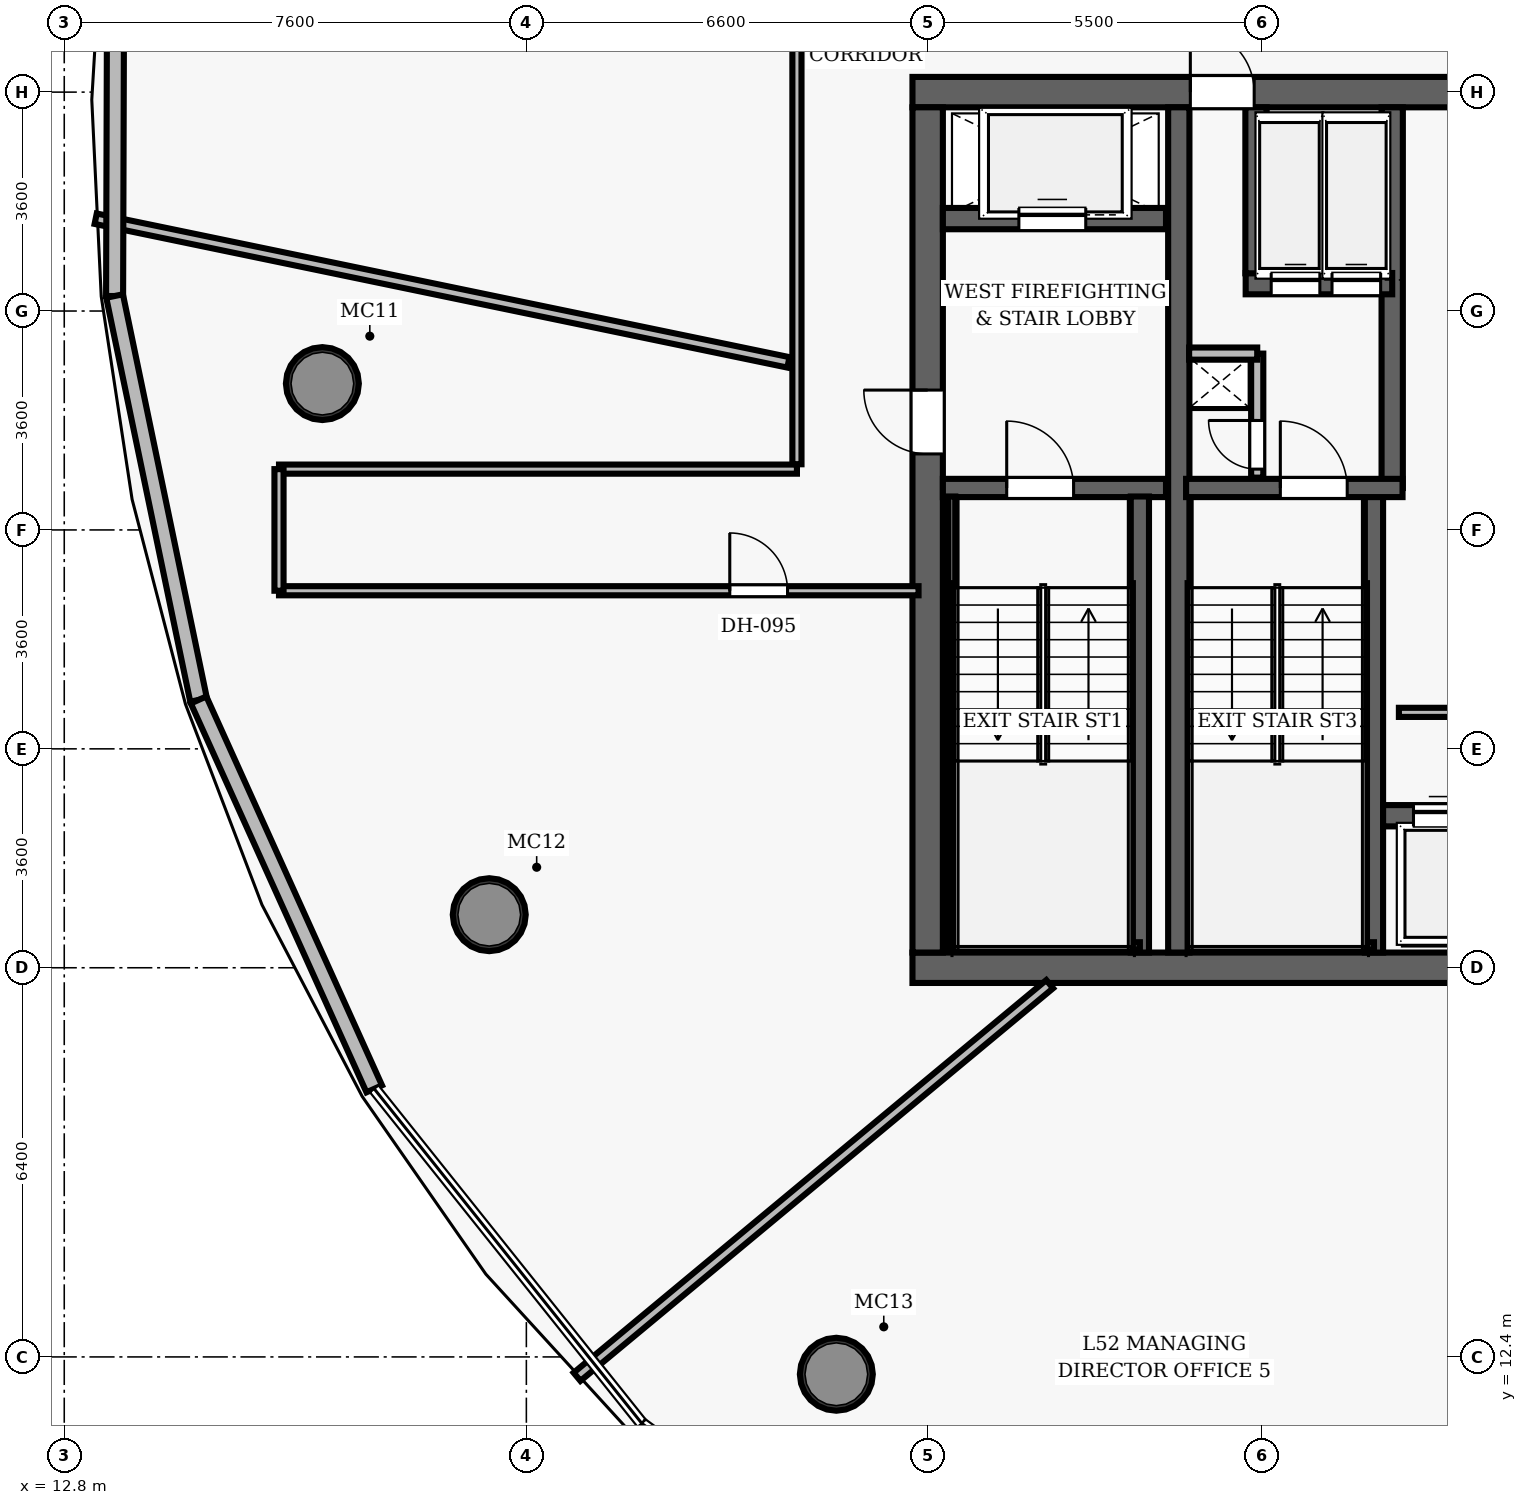
"""IFC4 building model, lengths in metres.
Left out: names, types, materials, properties, quantities, classifications, styles, units other than length and angle.
Written with IfcOpenShell. Run it as: python <this file> out.ifc"""

import sys

from ifc_helpers import new_model, si_unit, direction, frame, frame_2d, origin, origin_2d, place, context, subcontext, project, spatial, rectangle, hollow_circle, extrude, element, fill, save


model = new_model("IFC4")
c1 = context("Model", 3, precision=1e-05, world=origin(), true_north=direction((0.0, 1.0)))
c2 = subcontext(c1, "Body", "Model", "MODEL_VIEW")
j1 = project(units=[si_unit("LENGTHUNIT", "METRE"), si_unit("PLANEANGLEUNIT", "RADIAN")], contexts=[c1])
p1 = place(None, origin())
s1 = spatial("IfcSite", under=j1, at=p1, CompositionType="ELEMENT")
p2 = place(p1, origin())
s2 = spatial("IfcBuilding", under=s1, at=p2, CompositionType="ELEMENT")
p3 = place(p2, frame((0.0, 0.0, 205.85)))
s3 = spatial("IfcBuildingStorey", under=s2, at=p3, CompositionType="ELEMENT", Elevation=205.85)
p4 = place(p3, frame((26.75, 18.8, 0.0), z_axis=(0.0, 0.0, 1.0), x_axis=(1.0, 0.0, 0.0)))
e1 = element("IfcWall", 1, at=p4, inside=s3, PredefinedType="SHEAR", context=c2, shape_type="SweptSolid", body=[
    extrude(rectangle(XDim=22.5, YDim=0.5, at=frame_2d((11.25, 0.0))), origin(), (0.0, 0.0, 1.0), 3.85),
])
p5 = place(p4, frame((14.47, 0.0, 0.0)))
e2 = element("IfcOpeningElement", 2, at=p5, cuts=e1, PredefinedType="OPENING", context=c2, shape_type="SweptSolid", body=[
    extrude(rectangle(XDim=1.05, YDim=2.15, at=frame_2d((0.525, 1.075))), frame((0.0, 0.26, 0.0), z_axis=(0.0, -1.0, 0.0), x_axis=(1.0, 0.0, 0.0)), (0.0, 0.0, 1.0), 0.52),
])
p6 = place(p3, frame((26.75, 33.2, 0.0), z_axis=(0.0, 0.0, 1.0), x_axis=(1.0, 0.0, 0.0)))
e3 = element("IfcWall", 3, at=p6, inside=s3, PredefinedType="SHEAR", context=c2, shape_type="SweptSolid", body=[
    extrude(rectangle(XDim=22.5, YDim=0.5, at=frame_2d((11.25, 0.0))), origin(), (0.0, 0.0, 1.0), 3.85),
])
p7 = place(p6, frame((4.57, 0.0, 0.0)))
e4 = element("IfcOpeningElement", 4, at=p7, cuts=e3, PredefinedType="OPENING", context=c2, shape_type="SweptSolid", body=[
    extrude(rectangle(XDim=1.05, YDim=2.15, at=frame_2d((0.525, 1.075))), frame((0.0, 0.26, 0.0), z_axis=(0.0, -1.0, 0.0), x_axis=(1.0, 0.0, 0.0)), (0.0, 0.0, 1.0), 0.52),
])
p8 = place(p6, frame((14.47, 0.0, 0.0)))
e5 = element("IfcOpeningElement", 5, at=p8, cuts=e3, PredefinedType="OPENING", context=c2, shape_type="SweptSolid", body=[
    extrude(rectangle(XDim=1.05, YDim=2.15, at=frame_2d((0.525, 1.075))), frame((0.0, 0.26, 0.0), z_axis=(0.0, -1.0, 0.0), x_axis=(1.0, 0.0, 0.0)), (0.0, 0.0, 1.0), 0.52),
])
p9 = place(p3, frame((27.0, 19.05, 0.0), z_axis=(0.0, 0.0, 1.0), x_axis=(0.0, 1.0, 0.0)))
e6 = element("IfcWall", 6, at=p9, inside=s3, PredefinedType="SHEAR", context=c2, shape_type="SweptSolid", body=[
    extrude(rectangle(XDim=13.9, YDim=0.5, at=frame_2d((6.95, 0.0))), origin(), (0.0, 0.0, 1.0), 3.85),
])
p10 = place(p9, frame((8.2, 0.0, 0.0)))
e7 = element("IfcOpeningElement", 7, at=p10, cuts=e6, PredefinedType="OPENING", context=c2, shape_type="SweptSolid", body=[
    extrude(rectangle(XDim=1.05, YDim=2.15, at=frame_2d((0.525, 1.075))), frame((0.0, 0.26, 0.0), z_axis=(0.0, -1.0, 0.0), x_axis=(1.0, 0.0, 0.0)), (0.0, 0.0, 1.0), 0.52),
])
p11 = place(p3, frame((31.13, 19.05, 0.0), z_axis=(0.0, 0.0, 1.0), x_axis=(0.0, 1.0, 0.0)))
e8 = element("IfcWall", 8, at=p11, inside=s3, PredefinedType="SHEAR", context=c2, shape_type="SweptSolid", body=[
    extrude(rectangle(XDim=13.9, YDim=0.35, at=frame_2d((6.95, 0.0))), origin(), (0.0, 0.0, 1.0), 3.85),
])
for number, where, z_axis, x_axis in (
    (9, (17.045, 28.406, 0.0), (0.0, 0.0, 1.0), (1.0, 0.0, 0.0)),
    (10, (19.79, 19.673, 0.0), (0.0, 0.0, 1.0), (1.0, 0.0, 0.0)),
    (11, (25.498, 12.115, 0.0), (0.0, 0.0, 1.0), (1.0, 0.0, 0.0)),
):
    element("IfcColumn", number, at=place(p3, frame(where, z_axis=z_axis, x_axis=x_axis)), inside=s3, PredefinedType="COLUMN", context=c2, shape_type="SweptSolid", body=[
        extrude(hollow_circle(Radius=0.6, WallThickness=0.05, at=origin_2d()), origin(), (0.0, 0.0, 1.0), 3.85),
    ])
p12 = place(p3, frame((27.25, 26.69, 0.0), z_axis=(0.0, 0.0, 1.0), x_axis=(1.0, 0.0, 0.0)))
e12 = element("IfcWall", 12, at=p12, inside=s3, PredefinedType="SHEAR", context=c2, shape_type="SweptSolid", body=[
    extrude(rectangle(XDim=3.67, YDim=0.3, at=frame_2d((1.835, 0.0))), origin(), (0.0, 0.0, 1.0), 3.85),
])
p13 = place(p12, frame((1.05, 0.0, 0.0)))
e13 = element("IfcOpeningElement", 13, at=p13, cuts=e12, PredefinedType="OPENING", context=c2, shape_type="SweptSolid", body=[
    extrude(rectangle(XDim=1.1, YDim=2.15, at=frame_2d((0.55, 1.075))), frame((0.0, 0.16, 0.0), z_axis=(0.0, -1.0, 0.0), x_axis=(1.0, 0.0, 0.0)), (0.0, 0.0, 1.0), 0.32),
])
p14 = place(p3, frame((30.49, 19.05, 0.0), z_axis=(0.0, 0.0, 1.0), x_axis=(0.0, 1.0, 0.0)))
e14 = element("IfcWall", 14, at=p14, inside=s3, PredefinedType="SHEAR", context=c2, shape_type="SweptSolid", body=[
    extrude(rectangle(XDim=7.5, YDim=0.3, at=frame_2d((3.75, 0.0))), origin(), (0.0, 0.0, 1.0), 3.85),
])
p15 = place(p3, frame((27.395, 19.1, 0.0), z_axis=(0.0, 0.0, 1.0), x_axis=(0.0, 1.0, 0.0)))
e15 = element("IfcWall", 15, at=p15, inside=s3, PredefinedType="SHEAR", context=c2, shape_type="SweptSolid", body=[
    extrude(rectangle(XDim=7.45, YDim=0.12, at=frame_2d((3.725, 0.0))), origin(), (0.0, 0.0, 1.0), 3.85),
])
p16 = place(p3, frame((27.395, 19.16, 0.0), z_axis=(0.0, 0.0, 1.0), x_axis=(1.0, 0.0, 0.0)))
e16 = element("IfcWall", 16, at=p16, inside=s3, PredefinedType="SHEAR", context=c2, shape_type="SweptSolid", body=[
    extrude(rectangle(XDim=3.095, YDim=0.12, at=frame_2d((1.547, 0.0))), origin(), (0.0, 0.0, 1.0), 3.85),
])
p17 = place(p3, frame((27.25, 31.12, 0.0), z_axis=(0.0, 0.0, 1.0), x_axis=(1.0, 0.0, 0.0)))
e17 = element("IfcWall", 17, at=p17, inside=s3, PredefinedType="SHEAR", context=c2, shape_type="SweptSolid", body=[
    extrude(rectangle(XDim=3.67, YDim=0.35, at=frame_2d((1.835, 0.0))), origin(), (0.0, 0.0, 1.0), 3.035),
])
p18 = place(p17, frame((1.25, 0.0, 0.0)))
e18 = element("IfcOpeningElement", 18, at=p18, cuts=e17, PredefinedType="OPENING", context=c2, shape_type="SweptSolid", body=[
    extrude(rectangle(XDim=1.1, YDim=2.15, at=frame_2d((0.55, 1.075))), frame((0.0, 0.185, 0.0), z_axis=(0.0, -1.0, 0.0), x_axis=(1.0, 0.0, 0.0)), (0.0, 0.0, 1.0), 0.37),
])
p19 = place(p3, frame((34.34, 19.05, 0.0), z_axis=(0.0, 0.0, 1.0), x_axis=(0.0, 1.0, 0.0)))
e19 = element("IfcWall", 19, at=p19, inside=s3, PredefinedType="SHEAR", context=c2, shape_type="SweptSolid", body=[
    extrude(rectangle(XDim=7.5, YDim=0.3, at=frame_2d((3.75, 0.0))), origin(), (0.0, 0.0, 1.0), 3.85),
])
p20 = place(p3, frame((34.64, 26.69, 0.0), z_axis=(0.0, 0.0, 1.0), x_axis=(0.0, 1.0, 0.0)))
e20 = element("IfcWall", 20, at=p20, inside=s3, PredefinedType="SHEAR", context=c2, shape_type="SweptSolid", body=[
    extrude(rectangle(XDim=6.26, YDim=0.35, at=frame_2d((3.13, 0.0))), origin(), (0.0, 0.0, 1.0), 3.85),
])
p21 = place(p3, frame((31.25, 26.69, 0.0), z_axis=(0.0, 0.0, 1.0), x_axis=(1.0, 0.0, 0.0)))
e21 = element("IfcWall", 21, at=p21, inside=s3, PredefinedType="SHEAR", context=c2, shape_type="SweptSolid", body=[
    extrude(rectangle(XDim=3.56, YDim=0.3, at=frame_2d((1.78, 0.0))), origin(), (0.0, 0.0, 1.0), 3.85),
])
p22 = place(p21, frame((1.55, 0.0, 0.0)))
e22 = element("IfcOpeningElement", 22, at=p22, cuts=e21, PredefinedType="OPENING", context=c2, shape_type="SweptSolid", body=[
    extrude(rectangle(XDim=1.1, YDim=2.15, at=frame_2d((0.55, 1.075))), frame((0.0, 0.16, 0.0), z_axis=(0.0, -1.0, 0.0), x_axis=(1.0, 0.0, 0.0)), (0.0, 0.0, 1.0), 0.32),
])
p23 = place(p3, frame((31.3, 19.16, 0.0), z_axis=(0.0, 0.0, 1.0), x_axis=(1.0, 0.0, 0.0)))
e23 = element("IfcWall", 23, at=p23, inside=s3, PredefinedType="SHEAR", context=c2, shape_type="SweptSolid", body=[
    extrude(rectangle(XDim=3.04, YDim=0.12, at=frame_2d((1.52, 0.0))), origin(), (0.0, 0.0, 1.0), 3.85),
])
p24 = place(p3, frame((32.23, 30.05, 0.0), z_axis=(0.0, 0.0, 1.0), x_axis=(1.0, 0.0, 0.0)))
e24 = element("IfcWall", 24, at=p24, inside=s3, PredefinedType="SHEAR", context=c2, shape_type="SweptSolid", body=[
    extrude(rectangle(XDim=2.41, YDim=0.35, at=frame_2d((1.205, 0.0))), origin(), (0.0, 0.0, 1.0), 3.035),
])
p25 = place(p24, frame((0.42, 0.0, 0.0)))
e25 = element("IfcOpeningElement", 25, at=p25, cuts=e24, PredefinedType="OPENING", context=c2, shape_type="SweptSolid", body=[
    extrude(rectangle(XDim=0.8, YDim=2.15, at=frame_2d((0.4, 1.075))), frame((0.0, 0.185, 0.0), z_axis=(0.0, -1.0, 0.0), x_axis=(1.0, 0.0, 0.0)), (0.0, 0.0, 1.0), 0.37),
])
p26 = place(p24, frame((1.42, 0.0, 0.0)))
e26 = element("IfcOpeningElement", 26, at=p26, cuts=e24, PredefinedType="OPENING", context=c2, shape_type="SweptSolid", body=[
    extrude(rectangle(XDim=0.8, YDim=2.15, at=frame_2d((0.4, 1.075))), frame((0.0, 0.185, 0.0), z_axis=(0.0, -1.0, 0.0), x_axis=(1.0, 0.0, 0.0)), (0.0, 0.0, 1.0), 0.37),
])
p27 = place(p3, frame((32.4, 30.22, 0.0), z_axis=(0.0, 0.0, 1.0), x_axis=(0.0, 1.0, 0.0)))
e27 = element("IfcWall", 27, at=p27, inside=s3, PredefinedType="SHEAR", context=c2, shape_type="SweptSolid", body=[
    extrude(rectangle(XDim=2.73, YDim=0.35, at=frame_2d((1.365, 0.0))), origin(), (0.0, 0.0, 1.0), 3.035),
])
p28 = place(p3, frame((32.42, 26.86, 0.0), z_axis=(0.0, 0.0, 1.0), x_axis=(0.0, 1.0, 0.0)))
e28 = element("IfcWall", 28, at=p28, inside=s3, PredefinedType="PARTITIONING", context=c2, shape_type="SweptSolid", body=[
    extrude(rectangle(XDim=2.04, YDim=0.2, at=frame_2d((1.02, 0.0))), origin(), (0.0, 0.0, 1.0), 3.035),
])
p29 = place(p28, frame((0.14, 0.0, 0.0)))
e29 = element("IfcOpeningElement", 29, at=p29, cuts=e28, PredefinedType="OPENING", context=c2, shape_type="SweptSolid", body=[
    extrude(rectangle(XDim=0.8, YDim=2.05, at=frame_2d((0.4, 1.025))), frame((0.0, 0.11, 0.0), z_axis=(0.0, -1.0, 0.0), x_axis=(1.0, 0.0, 0.0)), (0.0, 0.0, 1.0), 0.22),
])
p30 = place(p3, frame((31.3, 28.9, 0.0), z_axis=(0.0, 0.0, 1.0), x_axis=(1.0, 0.0, 0.0)))
e30 = element("IfcWall", 30, at=p30, inside=s3, PredefinedType="PARTITIONING", context=c2, shape_type="SweptSolid", body=[
    extrude(rectangle(XDim=1.12, YDim=0.2, at=frame_2d((0.56, 0.0))), origin(), (0.0, 0.0, 1.0), 3.035),
])
p31 = place(p3, frame((34.49, 21.3, 0.0), z_axis=(0.0, 0.0, 1.0), x_axis=(1.0, 0.0, 0.0)))
e31 = element("IfcWall", 31, at=p31, inside=s3, PredefinedType="SHEAR", context=c2, shape_type="SweptSolid", body=[
    extrude(rectangle(XDim=6.68, YDim=0.35, at=frame_2d((3.34, 0.0))), origin(), (0.0, 0.0, 1.0), 3.035),
])
p32 = place(p31, frame((0.5, 0.0, 0.0)))
e32 = element("IfcOpeningElement", 32, at=p32, cuts=e31, PredefinedType="OPENING", context=c2, shape_type="SweptSolid", body=[
    extrude(rectangle(XDim=0.9, YDim=2.15, at=frame_2d((0.45, 1.075))), frame((0.0, 0.185, 0.0), z_axis=(0.0, -1.0, 0.0), x_axis=(1.0, 0.0, 0.0)), (0.0, 0.0, 1.0), 0.37),
])
p33 = place(p31, frame((2.58, 0.0, 0.0)))
e33 = element("IfcOpeningElement", 33, at=p33, cuts=e31, PredefinedType="OPENING", context=c2, shape_type="SweptSolid", body=[
    extrude(rectangle(XDim=0.9, YDim=2.15, at=frame_2d((0.45, 1.075))), frame((0.0, 0.185, 0.0), z_axis=(0.0, -1.0, 0.0), x_axis=(1.0, 0.0, 0.0)), (0.0, 0.0, 1.0), 0.37),
])
p34 = place(p31, frame((4.66, 0.0, 0.0)))
e34 = element("IfcOpeningElement", 34, at=p34, cuts=e31, PredefinedType="OPENING", context=c2, shape_type="SweptSolid", body=[
    extrude(rectangle(XDim=0.9, YDim=2.15, at=frame_2d((0.45, 1.075))), frame((0.0, 0.185, 0.0), z_axis=(0.0, -1.0, 0.0), x_axis=(1.0, 0.0, 0.0)), (0.0, 0.0, 1.0), 0.37),
])
p35 = place(p3, frame((34.75, 23.0, 0.0), z_axis=(0.0, 0.0, 1.0), x_axis=(1.0, 0.0, 0.0)))
e35 = element("IfcWall", 35, at=p35, inside=s3, PredefinedType="PARTITIONING", context=c2, shape_type="SweptSolid", body=[
    extrude(rectangle(XDim=6.25, YDim=0.15, at=frame_2d((3.125, 0.0))), origin(), (0.0, 0.0, 1.0), 3.035),
])
p36 = place(p3, frame((24.85, 27.08, 0.0), z_axis=(0.0, 0.0, 1.0), x_axis=(0.0, 1.0, 0.0)))
e36 = element("IfcWall", 36, at=p36, inside=s3, PredefinedType="PARTITIONING", context=c2, shape_type="SweptSolid", body=[
    extrude(rectangle(XDim=8.12, YDim=0.15, at=frame_2d((4.06, 0.0))), origin(), (0.0, 0.0, 1.0), 3.035),
])
p37 = place(p3, frame((16.332, 27.0, 0.0), z_axis=(0.0, 0.0, 1.0), x_axis=(1.0, 0.0, 0.0)))
e37 = element("IfcWall", 37, at=p37, inside=s3, PredefinedType="PARTITIONING", context=c2, shape_type="SweptSolid", body=[
    extrude(rectangle(XDim=8.518, YDim=0.15, at=frame_2d((4.259, 0.0))), origin(), (0.0, 0.0, 1.0), 3.035),
])
p38 = place(p3, frame((16.332, 25.0, 0.0), z_axis=(0.0, 0.0, 1.0), x_axis=(1.0, 0.0, 0.0)))
e38 = element("IfcWall", 38, at=p38, inside=s3, PredefinedType="PARTITIONING", context=c2, shape_type="SweptSolid", body=[
    extrude(rectangle(XDim=10.518, YDim=0.15, at=frame_2d((5.259, 0.0))), origin(), (0.0, 0.0, 1.0), 3.035),
])
p39 = place(p38, frame((7.414, 0.0, 0.0)))
e39 = element("IfcOpeningElement", 39, at=p39, cuts=e38, PredefinedType="OPENING", context=c2, shape_type="SweptSolid", body=[
    extrude(rectangle(XDim=0.95, YDim=2.15, at=frame_2d((0.475, 1.075))), frame((0.0, 0.085, 0.0), z_axis=(0.0, -1.0, 0.0), x_axis=(1.0, 0.0, 0.0)), (0.0, 0.0, 1.0), 0.17),
])
p40 = place(p3, frame((16.332, 25.0, 0.0), z_axis=(0.0, 0.0, 1.0), x_axis=(0.0, 1.0, 0.0)))
e40 = element("IfcWall", 40, at=p40, inside=s3, PredefinedType="PARTITIONING", context=c2, shape_type="SweptSolid", body=[
    extrude(rectangle(XDim=2.0, YDim=0.15, at=frame_2d((1.0, 0.0))), origin(), (0.0, 0.0, 1.0), 3.035),
])
p41 = place(p3, frame((24.71, 28.756, 0.0), z_axis=(0.0, 0.0, 1.0), x_axis=(-0.979173048769, 0.203027437961, 0.0)))
e41 = element("IfcWall", 41, at=p41, inside=s3, PredefinedType="PARTITIONING", context=c2, shape_type="SweptSolid", body=[
    extrude(rectangle(XDim=11.635, YDim=0.175, at=frame_2d((5.818, 0.0))), origin(), (0.0, 0.0, 1.0), 3.035),
])
p42 = place(p3, frame((29.007, 18.53, 0.0), z_axis=(0.0, 0.0, 1.0), x_axis=(-0.769234217395, -0.638966915253, 0.0)))
e42 = element("IfcWall", 42, at=p42, inside=s3, PredefinedType="PARTITIONING", context=c2, shape_type="SweptSolid", body=[
    extrude(rectangle(XDim=10.105, YDim=0.175, at=frame_2d((5.053, 0.0))), origin(), (0.0, 0.0, 1.0), 3.035),
])
p43 = place(p3, frame((13.628, 29.847, 0.0), z_axis=(0.0, 0.0, 1.0), x_axis=(0.003136870423, 0.99999508001, 0.0)))
e43 = element("IfcWall", 43, at=p43, inside=s3, PredefinedType="SOLIDWALL", context=c2, shape_type="SweptSolid", body=[
    extrude(rectangle(XDim=6.226, YDim=0.28, at=frame_2d((3.113, 0.0))), origin(), (0.0, 0.0, 1.0), 3.62),
])
p44 = place(p3, frame((15.009, 23.204, 0.0), z_axis=(0.0, 0.0, 1.0), x_axis=(-0.203597872563, 0.979054598216, 0.0)))
e44 = element("IfcWall", 44, at=p44, inside=s3, PredefinedType="SOLIDWALL", context=c2, shape_type="SweptSolid", body=[
    extrude(rectangle(XDim=6.785, YDim=0.28, at=frame_2d((3.392, 0.0))), origin(), (0.0, 0.0, 1.0), 3.62),
])
p45 = place(p3, frame((17.898, 16.809, 0.0), z_axis=(0.0, 0.0, 1.0), x_axis=(-0.411673410611, 0.911331445192, 0.0)))
e45 = element("IfcWall", 45, at=p45, inside=s3, PredefinedType="SOLIDWALL", context=c2, shape_type="SweptSolid", body=[
    extrude(rectangle(XDim=7.018, YDim=0.28, at=frame_2d((3.509, 0.0))), origin(), (0.0, 0.0, 1.0), 3.62),
])
p46 = place(p13, origin())
e46 = element("IfcDoor", 46, at=p46, inside=s3, OperationType="SINGLE_SWING_LEFT", PredefinedType="DOOR", context=c2, shape_type="SweptSolid", body=[
    extrude(rectangle(XDim=1.1, YDim=2.15, at=frame_2d((0.55, 1.075))), frame((0.0, 0.025, 0.0), z_axis=(0.0, -1.0, 0.0), x_axis=(1.0, 0.0, 0.0)), (0.0, 0.0, 1.0), 0.05),
])
fill(e13, e46)
p47 = place(p10, origin())
e47 = element("IfcDoor", 47, at=p47, inside=s3, OperationType="SINGLE_SWING_RIGHT", PredefinedType="DOOR", context=c2, shape_type="SweptSolid", body=[
    extrude(rectangle(XDim=1.05, YDim=2.15, at=frame_2d((0.525, 1.075))), frame((0.0, 0.025, 0.0), z_axis=(0.0, -1.0, 0.0), x_axis=(1.0, 0.0, 0.0)), (0.0, 0.0, 1.0), 0.05),
])
fill(e7, e47)
p48 = place(p22, origin())
e48 = element("IfcDoor", 48, at=p48, inside=s3, OperationType="SINGLE_SWING_LEFT", PredefinedType="DOOR", context=c2, shape_type="SweptSolid", body=[
    extrude(rectangle(XDim=1.1, YDim=2.15, at=frame_2d((0.55, 1.075))), frame((0.0, 0.025, 0.0), z_axis=(0.0, -1.0, 0.0), x_axis=(1.0, 0.0, 0.0)), (0.0, 0.0, 1.0), 0.05),
])
fill(e22, e48)
p49 = place(p29, origin())
e49 = element("IfcDoor", 49, at=p49, inside=s3, OperationType="SINGLE_SWING_RIGHT", PredefinedType="DOOR", context=c2, shape_type="SweptSolid", body=[
    extrude(rectangle(XDim=0.8, YDim=2.05, at=frame_2d((0.4, 1.025))), frame((0.0, 0.025, 0.0), z_axis=(0.0, -1.0, 0.0), x_axis=(1.0, 0.0, 0.0)), (0.0, 0.0, 1.0), 0.05),
])
fill(e29, e49)
p50 = place(p7, origin())
e50 = element("IfcDoor", 50, at=p50, inside=s3, OperationType="SINGLE_SWING_LEFT", PredefinedType="DOOR", context=c2, shape_type="SweptSolid", body=[
    extrude(rectangle(XDim=1.05, YDim=2.15, at=frame_2d((0.525, 1.075))), frame((0.0, 0.025, 0.0), z_axis=(0.0, -1.0, 0.0), x_axis=(1.0, 0.0, 0.0)), (0.0, 0.0, 1.0), 0.05),
])
fill(e4, e50)
p51 = place(p39, origin())
e51 = element("IfcDoor", 51, at=p51, inside=s3, OperationType="SINGLE_SWING_LEFT", PredefinedType="DOOR", context=c2, shape_type="SweptSolid", body=[
    extrude(rectangle(XDim=0.95, YDim=2.15, at=frame_2d((0.475, 1.075))), frame((0.0, 0.025, 0.0), z_axis=(0.0, -1.0, 0.0), x_axis=(1.0, 0.0, 0.0)), (0.0, 0.0, 1.0), 0.05),
])
fill(e39, e51)
p52 = place(p32, origin())
e52 = element("IfcDoor", 52, at=p52, inside=s3, OperationType="SLIDING_TO_LEFT", PredefinedType="DOOR", context=c2, shape_type="SweptSolid", body=[
    extrude(rectangle(XDim=0.9, YDim=2.15, at=frame_2d((0.45, 1.075))), frame((0.0, 0.025, 0.0), z_axis=(0.0, -1.0, 0.0), x_axis=(1.0, 0.0, 0.0)), (0.0, 0.0, 1.0), 0.05),
])
fill(e32, e52)
p53 = place(p18, origin())
e53 = element("IfcDoor", 53, at=p53, inside=s3, OperationType="SLIDING_TO_LEFT", PredefinedType="DOOR", context=c2, shape_type="SweptSolid", body=[
    extrude(rectangle(XDim=1.1, YDim=2.15, at=frame_2d((0.55, 1.075))), frame((0.0, 0.025, 0.0), z_axis=(0.0, -1.0, 0.0), x_axis=(1.0, 0.0, 0.0)), (0.0, 0.0, 1.0), 0.05),
])
fill(e18, e53)
p54 = place(p25, origin())
e54 = element("IfcDoor", 54, at=p54, inside=s3, OperationType="SLIDING_TO_LEFT", PredefinedType="DOOR", context=c2, shape_type="SweptSolid", body=[
    extrude(rectangle(XDim=0.8, YDim=2.15, at=frame_2d((0.4, 1.075))), frame((0.0, 0.025, 0.0), z_axis=(0.0, -1.0, 0.0), x_axis=(1.0, 0.0, 0.0)), (0.0, 0.0, 1.0), 0.05),
])
fill(e25, e54)
p55 = place(p26, origin())
e55 = element("IfcDoor", 55, at=p55, inside=s3, OperationType="SLIDING_TO_LEFT", PredefinedType="DOOR", context=c2, shape_type="SweptSolid", body=[
    extrude(rectangle(XDim=0.8, YDim=2.15, at=frame_2d((0.4, 1.075))), frame((0.0, 0.025, 0.0), z_axis=(0.0, -1.0, 0.0), x_axis=(1.0, 0.0, 0.0)), (0.0, 0.0, 1.0), 0.05),
])
fill(e26, e55)
save(model, sys.argv[1])
